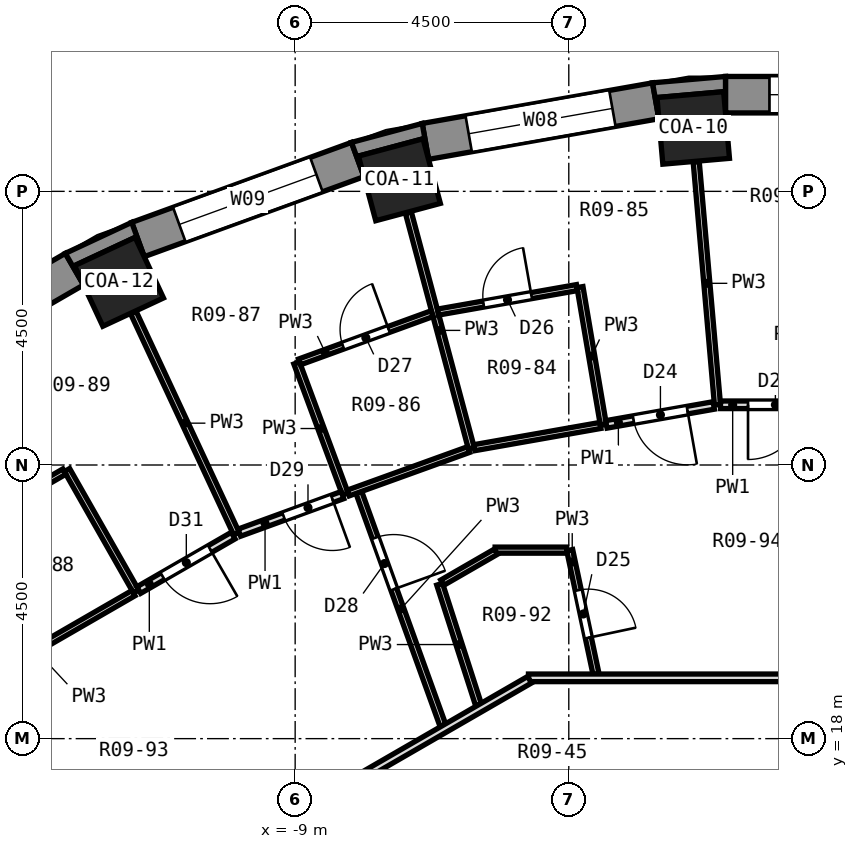
"""IFC4 building model, lengths in metres.
Left out: names, types, materials, properties, quantities, classifications, styles, units other than length and angle.
Written with IfcOpenShell. Run it as: python <this file> out.ifc"""

import sys

from ifc_helpers import new_model, si_unit, direction, frame, frame_2d, origin, origin_2d, place, context, subcontext, project, spatial, polyline, rectangle, outline, extrude, element, fill, save


model = new_model("IFC4")
c1 = context("Model", 3, precision=1e-05, world=origin(), true_north=direction((0.0, 1.0)))
c2 = subcontext(c1, "Body", "Model", "MODEL_VIEW")
j1 = project(units=[si_unit("LENGTHUNIT", "METRE"), si_unit("PLANEANGLEUNIT", "RADIAN")], contexts=[c1])
p1 = place(None, origin())
s1 = spatial("IfcSite", under=j1, at=p1, CompositionType="ELEMENT")
p2 = place(p1, origin())
s2 = spatial("IfcBuilding", under=s1, at=p2, CompositionType="ELEMENT")
p3 = place(p2, frame((0.0, 0.0, 26.3)))
s3 = spatial("IfcBuildingStorey", under=s2, at=p3, CompositionType="ELEMENT", Elevation=26.3)
for number, where, z_axis, x_axis in (
    (1, (-2.453, 28.043, -1.05), (0.0, 0.0, 1.0), (-0.087, 0.996, 0.0)),
    (2, (-7.286, 27.191, -1.05), (0.0, 0.0, 1.0), (-0.259, 0.966, 0.0)),
):
    element("IfcColumn", number, at=place(p3, frame(where, z_axis=z_axis, x_axis=x_axis)), inside=s3, PredefinedType="COLUMN", context=c2, shape_type="SweptSolid", body=[
        extrude(rectangle(XDim=1.1, YDim=1.1, at=origin_2d()), origin(), (0.0, 0.0, 1.0), 4.35),
    ])
p4 = place(p3, frame((-11.897, 25.512, 0.0), z_axis=(0.0, 0.0, 1.0), x_axis=(-0.422618261741, 0.906307787037, 0.0)))
e3 = element("IfcColumn", 3, at=p4, inside=s3, PredefinedType="COLUMN", context=c2, shape_type="SweptSolid", body=[
    extrude(rectangle(XDim=1.1, YDim=1.1, at=origin_2d()), origin(), (0.0, 0.0, 1.0), 3.3),
])
p5 = place(p3, frame((1.923, 28.59, 0.0), z_axis=(0.0, 0.0, 1.0), x_axis=(-1.0, 0.0, 0.0)))
e4 = element("IfcWall", 4, at=p5, inside=s3, PredefinedType="SOLIDWALL", context=c2, shape_type="SweptSolid", body=[
    extrude(rectangle(XDim=3.846, YDim=0.6, at=frame_2d((1.923, 0.0))), origin(), (0.0, 0.0, 1.0), 2.75),
])
p6 = place(p5, frame((0.723, 0.0, 0.9)))
e5 = element("IfcOpeningElement", 5, at=p6, cuts=e4, PredefinedType="OPENING", context=c2, shape_type="SweptSolid", body=[
    extrude(rectangle(XDim=2.4, YDim=1.8, at=frame_2d((1.2, 0.9))), frame((0.0, 0.312, 0.0), z_axis=(0.0, -1.0, 0.0), x_axis=(1.0, 0.0, 0.0)), (0.0, 0.0, 1.0), 0.624),
])
p7 = place(p3, frame((-3.071, 28.489, 0.0), z_axis=(0.0, 0.0, 1.0), x_axis=(-0.984800809218, -0.173687553279, 0.0)))
e6 = element("IfcWall", 6, at=p7, inside=s3, PredefinedType="SOLIDWALL", context=c2, shape_type="SweptSolid", body=[
    extrude(rectangle(XDim=3.846, YDim=0.6, at=frame_2d((1.923, 0.0))), origin(), (0.0, 0.0, 1.0), 2.75),
])
p8 = place(p7, frame((0.723, 0.0, 0.9)))
e7 = element("IfcOpeningElement", 7, at=p8, cuts=e6, PredefinedType="OPENING", context=c2, shape_type="SweptSolid", body=[
    extrude(rectangle(XDim=2.4, YDim=1.8, at=frame_2d((1.2, 0.9))), frame((0.0, 0.312, 0.0), z_axis=(0.0, -1.0, 0.0), x_axis=(1.0, 0.0, 0.0)), (0.0, 0.0, 1.0), 0.624),
])
p9 = place(p3, frame((-7.971, 27.523, 0.0), z_axis=(0.0, 0.0, 1.0), x_axis=(-0.939689588564, -0.342028474173, 0.0)))
e8 = element("IfcWall", 8, at=p9, inside=s3, PredefinedType="SOLIDWALL", context=c2, shape_type="SweptSolid", body=[
    extrude(rectangle(XDim=3.846, YDim=0.6, at=frame_2d((1.923, 0.0))), origin(), (0.0, 0.0, 1.0), 2.75),
])
p10 = place(p9, frame((0.723, 0.0, 0.9)))
e9 = element("IfcOpeningElement", 9, at=p10, cuts=e8, PredefinedType="OPENING", context=c2, shape_type="SweptSolid", body=[
    extrude(rectangle(XDim=2.4, YDim=1.8, at=frame_2d((1.2, 0.9))), frame((0.0, 0.312, 0.0), z_axis=(0.0, -1.0, 0.0), x_axis=(1.0, 0.0, 0.0)), (0.0, 0.0, 1.0), 0.624),
])
p11 = place(p3, frame((-12.63, 25.721, 0.0), z_axis=(0.0, 0.0, 1.0), x_axis=(-0.86603124159, -0.499989888488, 0.0)))
e10 = element("IfcWall", 10, at=p11, inside=s3, PredefinedType="SOLIDWALL", context=c2, shape_type="SweptSolid", body=[
    extrude(rectangle(XDim=3.846, YDim=0.6, at=frame_2d((1.923, 0.0))), origin(), (0.0, 0.0, 1.0), 2.75),
])
p12 = place(p11, frame((0.723, 0.0, 0.9)))
e11 = element("IfcOpeningElement", 11, at=p12, cuts=e10, PredefinedType="OPENING", context=c2, shape_type="SweptSolid", body=[
    extrude(rectangle(XDim=2.4, YDim=1.8, at=frame_2d((1.2, 0.9))), frame((0.0, 0.312, 0.0), z_axis=(0.0, -1.0, 0.0), x_axis=(1.0, 0.0, 0.0)), (0.0, 0.0, 1.0), 0.624),
])
p13 = place(p3, origin())
e12 = element("IfcWall", 12, at=p13, inside=s3, PredefinedType="SOLIDWALL", context=c2, shape_type="SweptSolid", body=[
    extrude(outline(polyline([(-1.923, 28.89), (-3.123, 28.785), (-3.019, 28.194), (-3.049, 28.543), (-1.954, 28.639), (-1.923, 28.29), (-1.923, 28.89)])), origin(), (0.0, 0.0, 1.0), 2.75),
])
p14 = place(p3, origin())
e13 = element("IfcWall", 13, at=p14, inside=s3, PredefinedType="SOLIDWALL", context=c2, shape_type="SweptSolid", body=[
    extrude(outline(polyline([(-6.91, 28.117), (-8.074, 27.805), (-7.869, 27.241), (-7.959, 27.58), (-6.897, 27.865), (-6.806, 27.526), (-6.91, 28.117)])), origin(), (0.0, 0.0, 1.0), 2.75),
])
p15 = place(p3, origin())
e14 = element("IfcWall", 14, at=p15, inside=s3, PredefinedType="SOLIDWALL", context=c2, shape_type="SweptSolid", body=[
    extrude(outline(polyline([(-12.78, 25.981), (-12.479, 25.461), (-12.628, 25.779), (-11.631, 26.243), (-11.483, 25.926), (-11.688, 26.49), (-12.78, 25.981)])), origin(), (0.0, 0.0, 1.0), 2.75),
])
p16 = place(p3, frame((-2.405, 27.485, 0.0), z_axis=(0.0, 0.0, 1.0), x_axis=(0.087176012461, -0.996192924514, 0.0)))
e15 = element("IfcWall", 15, at=p16, inside=s3, PredefinedType="PARTITIONING", context=c2, shape_type="SweptSolid", body=[
    extrude(rectangle(XDim=4.01, YDim=0.1, at=frame_2d((2.005, 0.0))), origin(), (0.0, 0.0, 1.0), 2.75),
])
p17 = place(p3, frame((-4.316, 25.426, 0.0), z_axis=(0.0, 0.0, 1.0), x_axis=(0.167445855502, -0.985881273519, 0.0)))
e16 = element("IfcWall", 16, at=p17, inside=s3, PredefinedType="PARTITIONING", context=c2, shape_type="SweptSolid", body=[
    extrude(rectangle(XDim=2.299, YDim=0.1, at=frame_2d((1.15, 0.0))), origin(), (0.0, 0.0, 1.0), 2.75),
])
p18 = place(p3, frame((-4.485, 21.1, 0.0), z_axis=(0.0, 0.0, 1.0), x_axis=(0.207769107872, -0.978177896813, 0.0)))
e17 = element("IfcWall", 17, at=p18, inside=s3, PredefinedType="PARTITIONING", context=c2, shape_type="SweptSolid", body=[
    extrude(rectangle(XDim=2.084, YDim=0.1, at=frame_2d((1.042, 0.0))), origin(), (0.0, 0.0, 1.0), 2.75),
])
p19 = place(p18, frame((0.673, 0.0, 0.0)))
e18 = element("IfcOpeningElement", 18, at=p19, cuts=e17, PredefinedType="OPENING", context=c2, shape_type="SweptSolid", body=[
    extrude(rectangle(XDim=0.8, YDim=2.1, at=frame_2d((0.4, 1.05))), frame((0.0, 0.062, 0.0), z_axis=(0.0, -1.0, 0.0), x_axis=(1.0, 0.0, 0.0)), (0.0, 0.0, 1.0), 0.124),
])
p20 = place(p3, frame((-7.138, 26.651, 0.0), z_axis=(0.0, 0.0, 1.0), x_axis=(0.258102122941, -0.966117639904, 0.0)))
e19 = element("IfcWall", 19, at=p20, inside=s3, PredefinedType="PARTITIONING", context=c2, shape_type="SweptSolid", body=[
    extrude(rectangle(XDim=4.011, YDim=0.1, at=frame_2d((2.005, 0.0))), origin(), (0.0, 0.0, 1.0), 2.75),
])
p21 = place(p3, frame((-6.624, 20.54, 0.0), z_axis=(0.0, 0.0, 1.0), x_axis=(0.306694945769, -0.951807864141, 0.0)))
e20 = element("IfcWall", 20, at=p21, inside=s3, PredefinedType="PARTITIONING", context=c2, shape_type="SweptSolid", body=[
    extrude(rectangle(XDim=2.086, YDim=0.1, at=frame_2d((1.043, 0.0))), origin(), (0.0, 0.0, 1.0), 2.75),
])
p22 = place(p3, frame((-7.953, 22.049, 0.0), z_axis=(0.0, 0.0, 1.0), x_axis=(0.339432395801, -0.940630452771, 0.0)))
e21 = element("IfcWall", 21, at=p22, inside=s3, PredefinedType="PARTITIONING", context=c2, shape_type="SweptSolid", body=[
    extrude(rectangle(XDim=4.074, YDim=0.1, at=frame_2d((2.037, 0.0))), origin(), (0.0, 0.0, 1.0), 2.75),
])
p23 = place(p22, frame((0.793, 0.0, 0.0)))
e22 = element("IfcOpeningElement", 22, at=p23, cuts=e21, PredefinedType="OPENING", context=c2, shape_type="SweptSolid", body=[
    extrude(rectangle(XDim=0.9, YDim=2.1, at=frame_2d((0.45, 1.05))), frame((0.0, 0.062, 0.0), z_axis=(0.0, -1.0, 0.0), x_axis=(1.0, 0.0, 0.0)), (0.0, 0.0, 1.0), 0.124),
])
p24 = place(p3, frame((-8.975, 24.178, 0.0), z_axis=(0.0, 0.0, 1.0), x_axis=(0.347898637283, -0.937532153143, 0.0)))
e23 = element("IfcWall", 23, at=p24, inside=s3, PredefinedType="PARTITIONING", context=c2, shape_type="SweptSolid", body=[
    extrude(rectangle(XDim=2.3, YDim=0.1, at=frame_2d((1.15, 0.0))), origin(), (0.0, 0.0, 1.0), 2.75),
])
p25 = place(p3, frame((-11.66, 25.005, 0.0), z_axis=(0.0, 0.0, 1.0), x_axis=(0.422575525044, -0.906327714259, 0.0)))
e24 = element("IfcWall", 24, at=p25, inside=s3, PredefinedType="PARTITIONING", context=c2, shape_type="SweptSolid", body=[
    extrude(rectangle(XDim=4.011, YDim=0.1, at=frame_2d((2.005, 0.0))), origin(), (0.0, 0.0, 1.0), 2.75),
])
p26 = place(p3, frame((-12.752, 22.417, 0.0), z_axis=(0.0, 0.0, 1.0), x_axis=(0.494388735629, -0.869240920621, 0.0)))
e25 = element("IfcWall", 25, at=p26, inside=s3, PredefinedType="PARTITIONING", context=c2, shape_type="SweptSolid", body=[
    extrude(rectangle(XDim=2.3, YDim=0.1, at=frame_2d((1.15, 0.0))), origin(), (0.0, 0.0, 1.0), 2.75),
])
p27 = place(p3, frame((-5.163, 19.0, 0.0), z_axis=(0.0, 0.0, 1.0), x_axis=(1.0, 0.0, 0.0)))
e26 = element("IfcWall", 26, at=p27, inside=s3, PredefinedType="PARTITIONING", context=c2, shape_type="SweptSolid", body=[
    extrude(rectangle(XDim=10.192, YDim=0.125, at=frame_2d((5.096, 0.0))), origin(), (0.0, 0.0, 1.0), 2.75),
])
p28 = place(p3, frame((-5.712, 21.1, 0.0), z_axis=(0.0, 0.0, 1.0), x_axis=(1.0, 0.0, 0.0)))
e27 = element("IfcWall", 27, at=p28, inside=s3, PredefinedType="PARTITIONING", context=c2, shape_type="SweptSolid", body=[
    extrude(rectangle(XDim=1.177, YDim=0.1, at=frame_2d((0.588, 0.0))), origin(), (0.0, 0.0, 1.0), 2.75),
])
p29 = place(p3, frame((-2.005, 23.49, 0.0), z_axis=(0.0, 0.0, 1.0), x_axis=(1.0, 0.0, 0.0)))
e28 = element("IfcWall", 28, at=p29, inside=s3, PredefinedType="PARTITIONING", context=c2, shape_type="SweptSolid", body=[
    extrude(rectangle(XDim=1.805, YDim=0.125, at=frame_2d((0.902, 0.0))), origin(), (0.0, 0.0, 1.0), 2.75),
])
p30 = place(p29, frame((0.452, 0.0, 0.0)))
e29 = element("IfcOpeningElement", 29, at=p30, cuts=e28, PredefinedType="OPENING", context=c2, shape_type="SweptSolid", body=[
    extrude(rectangle(XDim=0.9, YDim=2.1, at=frame_2d((0.45, 1.05))), frame((0.0, 0.074, 0.0), z_axis=(0.0, -1.0, 0.0), x_axis=(1.0, 0.0, 0.0)), (0.0, 0.0, 1.0), 0.149),
])
p31 = place(p3, frame((-6.054, 22.785, 0.0), z_axis=(0.0, 0.0, 1.0), x_axis=(0.984798730273, 0.173699340392, 0.0)))
e30 = element("IfcWall", 30, at=p31, inside=s3, PredefinedType="PARTITIONING", context=c2, shape_type="SweptSolid", body=[
    extrude(rectangle(XDim=2.105, YDim=0.1, at=frame_2d((1.053, 0.0))), origin(), (0.0, 0.0, 1.0), 2.75),
])
p32 = place(p3, frame((-3.882, 23.168, 0.0), z_axis=(0.0, 0.0, 1.0), x_axis=(0.984784929821, 0.173777564715, 0.0)))
e31 = element("IfcWall", 31, at=p32, inside=s3, PredefinedType="PARTITIONING", context=c2, shape_type="SweptSolid", body=[
    extrude(rectangle(XDim=1.793, YDim=0.125, at=frame_2d((0.896, 0.0))), origin(), (0.0, 0.0, 1.0), 2.75),
])
p33 = place(p32, frame((0.452, 0.0, 0.0)))
e32 = element("IfcOpeningElement", 32, at=p33, cuts=e31, PredefinedType="OPENING", context=c2, shape_type="SweptSolid", body=[
    extrude(rectangle(XDim=0.9, YDim=2.1, at=frame_2d((0.45, 1.05))), frame((0.0, 0.074, 0.0), z_axis=(0.0, -1.0, 0.0), x_axis=(1.0, 0.0, 0.0)), (0.0, 0.0, 1.0), 0.149),
])
p34 = place(p3, frame((-6.651, 25.015, 0.0), z_axis=(0.0, 0.0, 1.0), x_axis=(0.98483963522, 0.173467267515, 0.0)))
e33 = element("IfcWall", 33, at=p34, inside=s3, PredefinedType="PARTITIONING", context=c2, shape_type="SweptSolid", body=[
    extrude(rectangle(XDim=2.321, YDim=0.1, at=frame_2d((1.16, 0.0))), origin(), (0.0, 0.0, 1.0), 2.75),
])
p35 = place(p34, frame((0.76, 0.0, 0.0)))
e34 = element("IfcOpeningElement", 34, at=p35, cuts=e33, PredefinedType="OPENING", context=c2, shape_type="SweptSolid", body=[
    extrude(rectangle(XDim=0.8, YDim=2.1, at=frame_2d((0.4, 1.05))), frame((0.0, 0.062, 0.0), z_axis=(0.0, -1.0, 0.0), x_axis=(1.0, 0.0, 0.0)), (0.0, 0.0, 1.0), 0.124),
])
p36 = place(p3, frame((-8.128, 22.039, 0.0), z_axis=(0.0, 0.0, 1.0), x_axis=(0.940600209608, 0.339516193553, 0.0)))
e35 = element("IfcWall", 35, at=p36, inside=s3, PredefinedType="PARTITIONING", context=c2, shape_type="SweptSolid", body=[
    extrude(rectangle(XDim=2.105, YDim=0.1, at=frame_2d((1.052, 0.0))), origin(), (0.0, 0.0, 1.0), 2.75),
])
p37 = place(p3, frame((-9.918, 21.387, 0.0), z_axis=(0.0, 0.0, 1.0), x_axis=(0.93962745072, 0.342199143561, 0.0)))
e36 = element("IfcWall", 36, at=p37, inside=s3, PredefinedType="PARTITIONING", context=c2, shape_type="SweptSolid", body=[
    extrude(rectangle(XDim=1.805, YDim=0.125, at=frame_2d((0.902, 0.0))), origin(), (0.0, 0.0, 1.0), 2.75),
])
p38 = place(p37, frame((0.777, 0.0, 0.0)))
e37 = element("IfcOpeningElement", 37, at=p38, cuts=e36, PredefinedType="OPENING", context=c2, shape_type="SweptSolid", body=[
    extrude(rectangle(XDim=0.85, YDim=2.1, at=frame_2d((0.425, 1.05))), frame((0.0, 0.074, 0.0), z_axis=(0.0, -1.0, 0.0), x_axis=(1.0, 0.0, 0.0)), (0.0, 0.0, 1.0), 0.149),
])
p39 = place(p3, frame((-8.928, 24.195, 0.0), z_axis=(0.0, 0.0, 1.0), x_axis=(0.939670512052, 0.342080880465, 0.0)))
e38 = element("IfcWall", 38, at=p39, inside=s3, PredefinedType="PARTITIONING", context=c2, shape_type="SweptSolid", body=[
    extrude(rectangle(XDim=2.321, YDim=0.1, at=frame_2d((1.161, 0.0))), origin(), (0.0, 0.0, 1.0), 2.75),
])
p40 = place(p39, frame((0.76, 0.0, 0.0)))
e39 = element("IfcOpeningElement", 39, at=p40, cuts=e38, PredefinedType="OPENING", context=c2, shape_type="SweptSolid", body=[
    extrude(rectangle(XDim=0.8, YDim=2.1, at=frame_2d((0.4, 1.05))), frame((0.0, 0.062, 0.0), z_axis=(0.0, -1.0, 0.0), x_axis=(1.0, 0.0, 0.0)), (0.0, 0.0, 1.0), 0.124),
])
p41 = place(p3, frame((-13.844, 13.947, 0.0), z_axis=(0.0, 0.0, 1.0), x_axis=(0.866031375826, 0.499989655977, 0.0)))
e40 = element("IfcWall", 40, at=p41, inside=s3, PredefinedType="PARTITIONING", context=c2, shape_type="SweptSolid", body=[
    extrude(rectangle(XDim=10.045, YDim=0.125, at=frame_2d((5.022, 0.0))), origin(), (0.0, 0.0, 1.0), 2.75),
])
p42 = place(p41, frame((3.674, 0.0, 0.0)))
e41 = element("IfcOpeningElement", 41, at=p42, cuts=e40, PredefinedType="OPENING", context=c2, shape_type="SweptSolid", body=[
    extrude(rectangle(XDim=1.0, YDim=2.1, at=frame_2d((0.5, 1.05))), frame((0.0, 0.074, 0.0), z_axis=(0.0, -1.0, 0.0), x_axis=(1.0, 0.0, 0.0)), (0.0, 0.0, 1.0), 0.149),
])
p43 = place(p3, frame((-6.581, 20.565, 0.0), z_axis=(0.0, 0.0, 1.0), x_axis=(0.866070023821, 0.499922707865, 0.0)))
e42 = element("IfcWall", 42, at=p43, inside=s3, PredefinedType="PARTITIONING", context=c2, shape_type="SweptSolid", body=[
    extrude(rectangle(XDim=1.02, YDim=0.1, at=frame_2d((0.51, 0.0))), origin(), (0.0, 0.0, 1.0), 2.75),
])
p44 = place(p3, frame((-13.569, 19.29, 0.0), z_axis=(0.0, 0.0, 1.0), x_axis=(0.865946011253, 0.500137486693, 0.0)))
e43 = element("IfcWall", 43, at=p44, inside=s3, PredefinedType="PARTITIONING", context=c2, shape_type="SweptSolid", body=[
    extrude(rectangle(XDim=2.207, YDim=0.1, at=frame_2d((1.103, 0.0))), origin(), (0.0, 0.0, 1.0), 2.75),
])
p45 = place(p3, frame((-11.572, 20.443, 0.0), z_axis=(0.0, 0.0, 1.0), x_axis=(0.866140237675, 0.499801049099, 0.0)))
e44 = element("IfcWall", 44, at=p45, inside=s3, PredefinedType="PARTITIONING", context=c2, shape_type="SweptSolid", body=[
    extrude(rectangle(XDim=1.793, YDim=0.125, at=frame_2d((0.896, 0.0))), origin(), (0.0, 0.0, 1.0), 2.75),
])
p46 = place(p45, frame((0.452, 0.0, 0.0)))
e45 = element("IfcOpeningElement", 45, at=p46, cuts=e44, PredefinedType="OPENING", context=c2, shape_type="SweptSolid", body=[
    extrude(rectangle(XDim=0.9, YDim=2.1, at=frame_2d((0.45, 1.05))), frame((0.0, 0.074, 0.0), z_axis=(0.0, -1.0, 0.0), x_axis=(1.0, 0.0, 0.0)), (0.0, 0.0, 1.0), 0.149),
])
p47 = place(p3, frame((-14.806, 21.231, 0.0), z_axis=(0.0, 0.0, 1.0), x_axis=(0.865929854881, 0.500165459049, 0.0)))
e46 = element("IfcWall", 46, at=p47, inside=s3, PredefinedType="PARTITIONING", context=c2, shape_type="SweptSolid", body=[
    extrude(rectangle(XDim=2.322, YDim=0.1, at=frame_2d((1.161, 0.0))), origin(), (0.0, 0.0, 1.0), 2.75),
])
p48 = place(p47, frame((0.761, 0.0, 0.0)))
e47 = element("IfcOpeningElement", 47, at=p48, cuts=e46, PredefinedType="OPENING", context=c2, shape_type="SweptSolid", body=[
    extrude(rectangle(XDim=0.8, YDim=2.1, at=frame_2d((0.4, 1.05))), frame((0.0, 0.062, 0.0), z_axis=(0.0, -1.0, 0.0), x_axis=(1.0, 0.0, 0.0)), (0.0, 0.0, 1.0), 0.124),
])
p49 = place(p6, origin())
e48 = element("IfcWindow", 48, at=p49, inside=s3, PartitioningType="SINGLE_PANEL", PredefinedType="WINDOW", context=c2, shape_type="SweptSolid", body=[
    extrude(rectangle(XDim=2.4, YDim=1.8, at=frame_2d((1.2, 0.9))), frame((0.0, 0.18, 0.0), z_axis=(0.0, -1.0, 0.0), x_axis=(1.0, 0.0, 0.0)), (0.0, 0.0, 1.0), 0.06),
])
fill(e5, e48)
p50 = place(p8, origin())
e49 = element("IfcWindow", 49, at=p50, inside=s3, PartitioningType="SINGLE_PANEL", PredefinedType="WINDOW", context=c2, shape_type="SweptSolid", body=[
    extrude(rectangle(XDim=2.4, YDim=1.8, at=frame_2d((1.2, 0.9))), frame((0.0, 0.18, 0.0), z_axis=(0.0, -1.0, 0.0), x_axis=(1.0, 0.0, 0.0)), (0.0, 0.0, 1.0), 0.06),
])
fill(e7, e49)
p51 = place(p10, origin())
e50 = element("IfcWindow", 50, at=p51, inside=s3, PartitioningType="SINGLE_PANEL", PredefinedType="WINDOW", context=c2, shape_type="SweptSolid", body=[
    extrude(rectangle(XDim=2.4, YDim=1.8, at=frame_2d((1.2, 0.9))), frame((0.0, 0.18, 0.0), z_axis=(0.0, -1.0, 0.0), x_axis=(1.0, 0.0, 0.0)), (0.0, 0.0, 1.0), 0.06),
])
fill(e9, e50)
p52 = place(p30, frame((0.9, 0.0, 0.0), z_axis=(0.0, 0.0, 1.0), x_axis=(-1.0, 0.0, 0.0)))
e51 = element("IfcDoor", 51, at=p52, inside=s3, OperationType="SINGLE_SWING_RIGHT", PredefinedType="DOOR", context=c2, shape_type="SweptSolid", body=[
    extrude(rectangle(XDim=0.9, YDim=2.1, at=frame_2d((0.45, 1.05))), frame((0.0, 0.025, 0.0), z_axis=(0.0, -1.0, 0.0), x_axis=(1.0, 0.0, 0.0)), (0.0, 0.0, 1.0), 0.05),
])
fill(e29, e51)
p53 = place(p33, frame((0.9, 0.0, 0.0), z_axis=(0.0, 0.0, 1.0), x_axis=(-1.0, 0.0, 0.0)))
e52 = element("IfcDoor", 52, at=p53, inside=s3, OperationType="SINGLE_SWING_LEFT", PredefinedType="DOOR", context=c2, shape_type="SweptSolid", body=[
    extrude(rectangle(XDim=0.9, YDim=2.1, at=frame_2d((0.45, 1.05))), frame((0.0, 0.025, 0.0), z_axis=(0.0, -1.0, 0.0), x_axis=(1.0, 0.0, 0.0)), (0.0, 0.0, 1.0), 0.05),
])
fill(e32, e52)
p54 = place(p19, origin())
e53 = element("IfcDoor", 53, at=p54, inside=s3, OperationType="SINGLE_SWING_RIGHT", PredefinedType="DOOR", context=c2, shape_type="SweptSolid", body=[
    extrude(rectangle(XDim=0.8, YDim=2.1, at=frame_2d((0.4, 1.05))), frame((0.0, 0.025, 0.0), z_axis=(0.0, -1.0, 0.0), x_axis=(1.0, 0.0, 0.0)), (0.0, 0.0, 1.0), 0.05),
])
fill(e18, e53)
p55 = place(p35, origin())
e54 = element("IfcDoor", 54, at=p55, inside=s3, OperationType="SINGLE_SWING_RIGHT", PredefinedType="DOOR", context=c2, shape_type="SweptSolid", body=[
    extrude(rectangle(XDim=0.8, YDim=2.1, at=frame_2d((0.4, 1.05))), frame((0.0, 0.025, 0.0), z_axis=(0.0, -1.0, 0.0), x_axis=(1.0, 0.0, 0.0)), (0.0, 0.0, 1.0), 0.05),
])
fill(e34, e54)
p56 = place(p40, origin())
e55 = element("IfcDoor", 55, at=p56, inside=s3, OperationType="SINGLE_SWING_RIGHT", PredefinedType="DOOR", context=c2, shape_type="SweptSolid", body=[
    extrude(rectangle(XDim=0.8, YDim=2.1, at=frame_2d((0.4, 1.05))), frame((0.0, 0.025, 0.0), z_axis=(0.0, -1.0, 0.0), x_axis=(1.0, 0.0, 0.0)), (0.0, 0.0, 1.0), 0.05),
])
fill(e39, e55)
p57 = place(p23, origin())
e56 = element("IfcDoor", 56, at=p57, inside=s3, OperationType="SINGLE_SWING_RIGHT", PredefinedType="DOOR", context=c2, shape_type="SweptSolid", body=[
    extrude(rectangle(XDim=0.9, YDim=2.1, at=frame_2d((0.45, 1.05))), frame((0.0, 0.025, 0.0), z_axis=(0.0, -1.0, 0.0), x_axis=(1.0, 0.0, 0.0)), (0.0, 0.0, 1.0), 0.05),
])
fill(e22, e56)
p58 = place(p38, frame((0.85, 0.0, 0.0), z_axis=(0.0, 0.0, 1.0), x_axis=(-1.0, 0.0, 0.0)))
e57 = element("IfcDoor", 57, at=p58, inside=s3, OperationType="SINGLE_SWING_LEFT", PredefinedType="DOOR", context=c2, shape_type="SweptSolid", body=[
    extrude(rectangle(XDim=0.85, YDim=2.1, at=frame_2d((0.425, 1.05))), frame((0.0, 0.025, 0.0), z_axis=(0.0, -1.0, 0.0), x_axis=(1.0, 0.0, 0.0)), (0.0, 0.0, 1.0), 0.05),
])
fill(e37, e57)
p59 = place(p46, frame((0.9, 0.0, 0.0), z_axis=(0.0, 0.0, 1.0), x_axis=(-1.0, 0.0, 0.0)))
e58 = element("IfcDoor", 58, at=p59, inside=s3, OperationType="SINGLE_SWING_LEFT", PredefinedType="DOOR", context=c2, shape_type="SweptSolid", body=[
    extrude(rectangle(XDim=0.9, YDim=2.1, at=frame_2d((0.45, 1.05))), frame((0.0, 0.025, 0.0), z_axis=(0.0, -1.0, 0.0), x_axis=(1.0, 0.0, 0.0)), (0.0, 0.0, 1.0), 0.05),
])
fill(e45, e58)
save(model, sys.argv[1])
